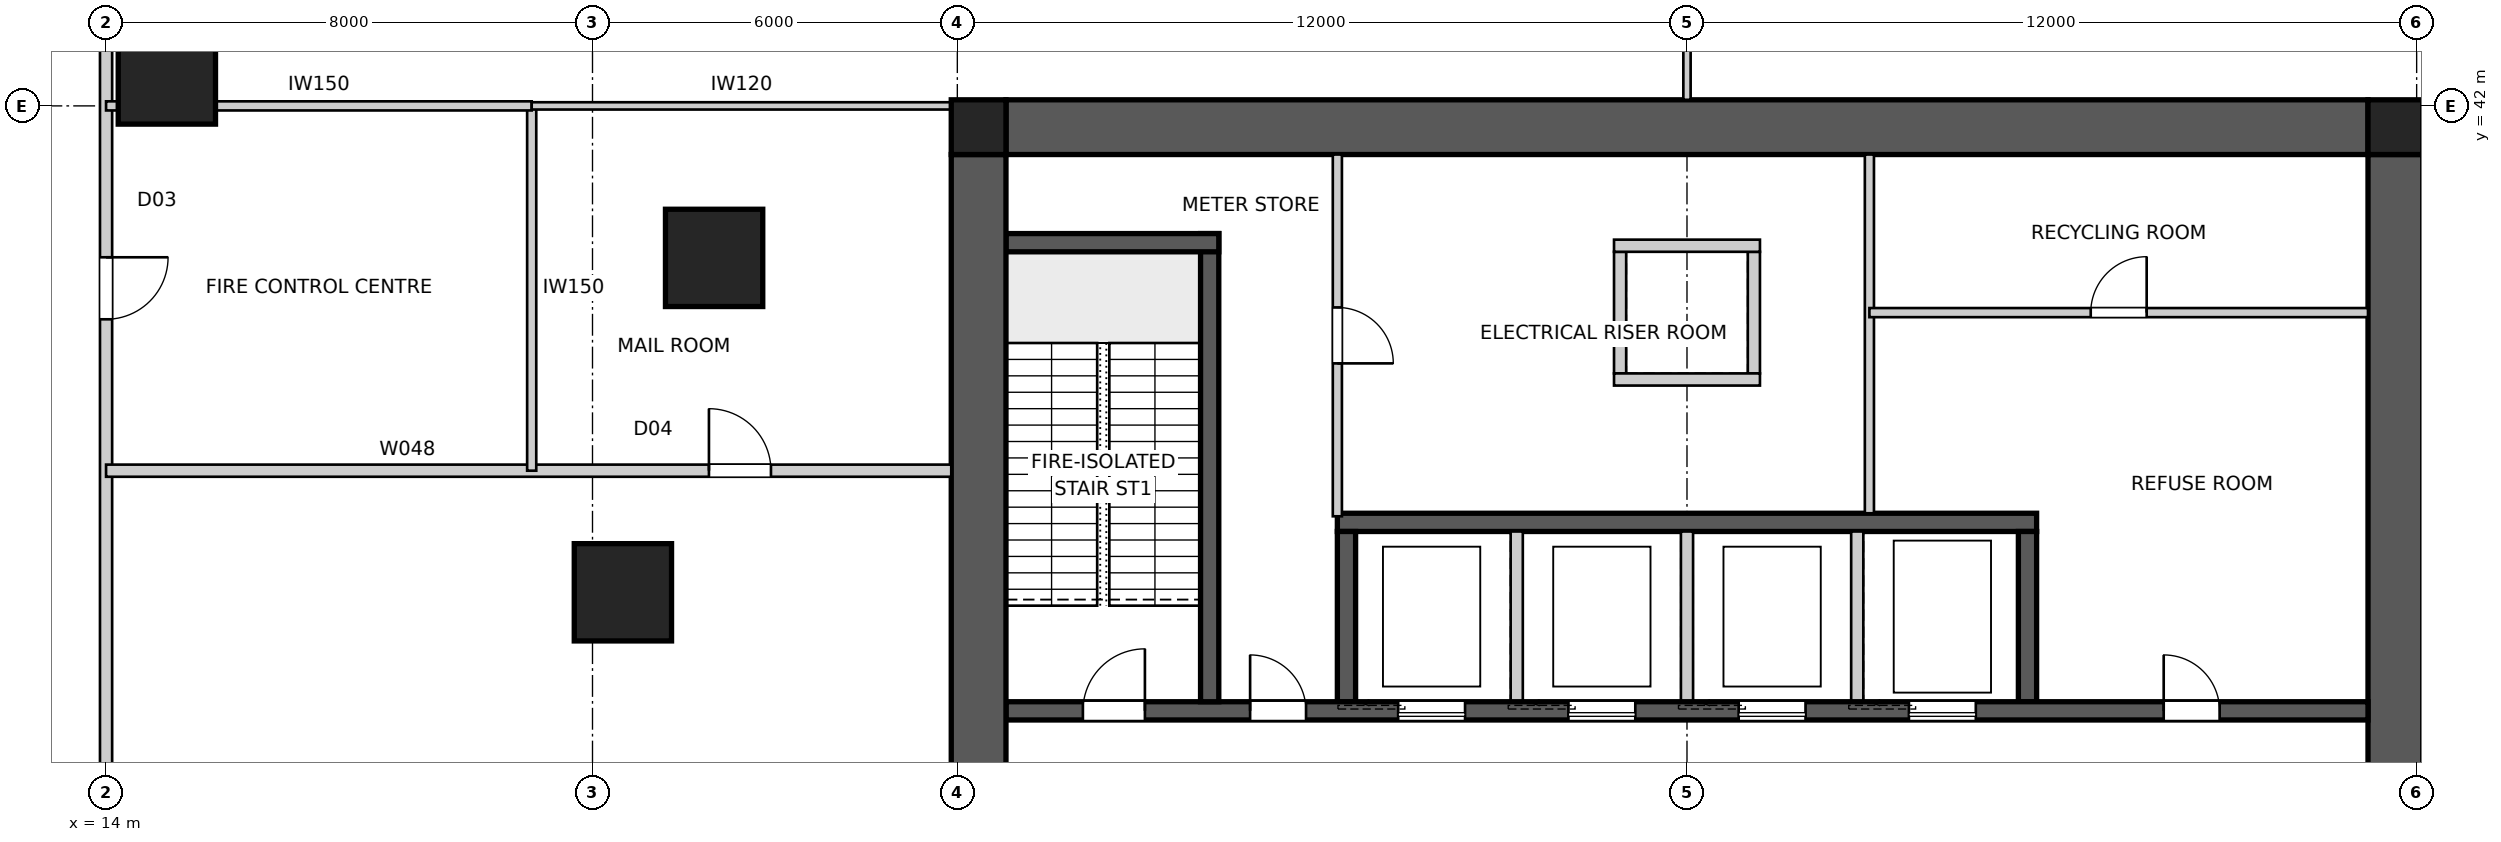
"""IFC4 building model, lengths in metres.
Left out: names, types, materials, properties, quantities, classifications, styles, units other than length and angle.
Written with IfcOpenShell. Run it as: python <this file> out.ifc"""

import sys

from ifc_helpers import new_model, si_unit, direction, frame, frame_2d, origin, origin_2d, place, context, subcontext, project, spatial, polyline, rectangle, outline, extrude, element, fill, save


model = new_model("IFC4")
c1 = context("Model", 3, precision=1e-05, world=origin(), true_north=direction((0.0, 1.0)))
c2 = subcontext(c1, "Body", "Model", "MODEL_VIEW")
j1 = project(units=[si_unit("LENGTHUNIT", "METRE"), si_unit("PLANEANGLEUNIT", "RADIAN")], contexts=[c1])
p1 = place(None, origin())
s1 = spatial("IfcSite", under=j1, at=p1, CompositionType="ELEMENT")
p2 = place(p1, origin())
s2 = spatial("IfcBuilding", under=s1, at=p2, CompositionType="ELEMENT")
p3 = place(p2, origin())
s3 = spatial("IfcBuildingStorey", under=s2, at=p3, CompositionType="ELEMENT", Elevation=0.0)
p4 = place(p3, frame((28.8, 41.65, 0.0), z_axis=(0.0, 0.0, 1.0), x_axis=(1.0, 0.0, 0.0)))
e1 = element("IfcWall", 1, at=p4, inside=s3, PredefinedType="SHEAR", context=c2, shape_type="SweptSolid", body=[
    extrude(outline(polyline([(0.0, -0.45), (22.4, -0.45), (22.4, -0.025), (22.85, -0.025), (22.85, 0.025), (22.4, 0.025), (22.4, 0.45), (0.0, 0.45), (0.0, 0.025), (-0.45, 0.025), (-0.45, -0.025), (0.0, -0.025), (0.0, -0.45)])), origin(), (0.0, 0.0, 1.0), 6.0),
])
p5 = place(p3, frame((51.65, 18.8, 0.0), z_axis=(0.0, 0.0, 1.0), x_axis=(0.0, 1.0, 0.0)))
e2 = element("IfcWall", 2, at=p5, inside=s3, PredefinedType="SHEAR", context=c2, shape_type="SweptSolid", body=[
    extrude(outline(polyline([(0.0, -0.45), (22.4, -0.45), (22.4, -0.025), (22.85, -0.025), (22.85, 0.025), (22.4, 0.025), (22.4, 0.45), (0.0, 0.45), (0.0, 0.025), (-0.45, 0.025), (-0.45, -0.025), (0.0, -0.025), (0.0, -0.45)])), origin(), (0.0, 0.0, 1.0), 6.0),
])
p6 = place(p5, frame((11.14, 0.0, 0.0)))
e3 = element("IfcOpeningElement", 3, at=p6, cuts=e2, PredefinedType="OPENING", context=c2, shape_type="SweptSolid", body=[
    extrude(rectangle(XDim=1.02, YDim=2.4, at=frame_2d((0.51, 1.2))), frame((0.0, 0.46, 0.0), z_axis=(0.0, -1.0, 0.0), x_axis=(1.0, 0.0, 0.0)), (0.0, 0.0, 1.0), 0.92),
])
p7 = place(p3, frame((28.35, 41.2, 0.0), z_axis=(0.0, 0.0, 1.0), x_axis=(0.0, -1.0, 0.0)))
e4 = element("IfcWall", 4, at=p7, inside=s3, PredefinedType="SHEAR", context=c2, shape_type="SweptSolid", body=[
    extrude(outline(polyline([(0.0, -0.45), (22.4, -0.45), (22.4, -0.025), (22.85, -0.025), (22.85, 0.025), (22.4, 0.025), (22.4, 0.45), (0.0, 0.45), (0.0, 0.025), (-0.45, 0.025), (-0.45, -0.025), (0.0, -0.025), (0.0, -0.45)])), origin(), (0.0, 0.0, 1.0), 6.0),
])
p8 = place(p7, frame((11.14, 0.0, 0.0)))
e5 = element("IfcOpeningElement", 5, at=p8, cuts=e4, PredefinedType="OPENING", context=c2, shape_type="SweptSolid", body=[
    extrude(rectangle(XDim=1.02, YDim=2.4, at=frame_2d((0.51, 1.2))), frame((0.0, 0.46, 0.0), z_axis=(0.0, -1.0, 0.0), x_axis=(1.0, 0.0, 0.0)), (0.0, 0.0, 1.0), 0.92),
])
p9 = place(p3, frame((28.8, 32.05, 0.0), z_axis=(0.0, 0.0, 1.0), x_axis=(1.0, 0.0, 0.0)))
e6 = element("IfcWall", 6, at=p9, inside=s3, PredefinedType="SHEAR", context=c2, shape_type="SweptSolid", body=[
    extrude(rectangle(XDim=22.4, YDim=0.3, at=frame_2d((11.2, 0.0))), origin(), (0.0, 0.0, 1.0), 6.0),
])
p10 = place(p9, frame((19.04, 0.0, 0.0)))
e7 = element("IfcOpeningElement", 7, at=p10, cuts=e6, PredefinedType="OPENING", context=c2, shape_type="SweptSolid", body=[
    extrude(rectangle(XDim=0.92, YDim=2.1, at=frame_2d((0.46, 1.05))), frame((0.0, 0.16, 0.0), z_axis=(0.0, -1.0, 0.0), x_axis=(1.0, 0.0, 0.0)), (0.0, 0.0, 1.0), 0.32),
])
p11 = place(p9, frame((1.265, 0.0, 0.0)))
e8 = element("IfcOpeningElement", 8, at=p11, cuts=e6, PredefinedType="OPENING", context=c2, shape_type="SweptSolid", body=[
    extrude(rectangle(XDim=1.02, YDim=2.1, at=frame_2d((0.51, 1.05))), frame((0.0, 0.16, 0.0), z_axis=(0.0, -1.0, 0.0), x_axis=(1.0, 0.0, 0.0)), (0.0, 0.0, 1.0), 0.32),
])
p12 = place(p9, frame((4.015, 0.0, 0.0)))
e9 = element("IfcOpeningElement", 9, at=p12, cuts=e6, PredefinedType="OPENING", context=c2, shape_type="SweptSolid", body=[
    extrude(rectangle(XDim=0.92, YDim=2.1, at=frame_2d((0.46, 1.05))), frame((0.0, 0.16, 0.0), z_axis=(0.0, -1.0, 0.0), x_axis=(1.0, 0.0, 0.0)), (0.0, 0.0, 1.0), 0.32),
])
p13 = place(p9, frame((6.45, 0.0, 0.0)))
e10 = element("IfcOpeningElement", 10, at=p13, cuts=e6, PredefinedType="OPENING", context=c2, shape_type="SweptSolid", body=[
    extrude(rectangle(XDim=1.1, YDim=2.1, at=frame_2d((0.55, 1.05))), frame((0.0, 0.16, 0.0), z_axis=(0.0, -1.0, 0.0), x_axis=(1.0, 0.0, 0.0)), (0.0, 0.0, 1.0), 0.32),
])
p14 = place(p9, frame((9.25, 0.0, 0.0)))
e11 = element("IfcOpeningElement", 11, at=p14, cuts=e6, PredefinedType="OPENING", context=c2, shape_type="SweptSolid", body=[
    extrude(rectangle(XDim=1.1, YDim=2.1, at=frame_2d((0.55, 1.05))), frame((0.0, 0.16, 0.0), z_axis=(0.0, -1.0, 0.0), x_axis=(1.0, 0.0, 0.0)), (0.0, 0.0, 1.0), 0.32),
])
p15 = place(p9, frame((12.05, 0.0, 0.0)))
e12 = element("IfcOpeningElement", 12, at=p15, cuts=e6, PredefinedType="OPENING", context=c2, shape_type="SweptSolid", body=[
    extrude(rectangle(XDim=1.1, YDim=2.1, at=frame_2d((0.55, 1.05))), frame((0.0, 0.16, 0.0), z_axis=(0.0, -1.0, 0.0), x_axis=(1.0, 0.0, 0.0)), (0.0, 0.0, 1.0), 0.32),
])
p16 = place(p9, frame((14.85, 0.0, 0.0)))
e13 = element("IfcOpeningElement", 13, at=p16, cuts=e6, PredefinedType="OPENING", context=c2, shape_type="SweptSolid", body=[
    extrude(rectangle(XDim=1.1, YDim=2.1, at=frame_2d((0.55, 1.05))), frame((0.0, 0.16, 0.0), z_axis=(0.0, -1.0, 0.0), x_axis=(1.0, 0.0, 0.0)), (0.0, 0.0, 1.0), 0.32),
])
p17 = place(p3, frame((34.25, 35.15, 0.0), z_axis=(0.0, 0.0, 1.0), x_axis=(1.0, 0.0, 0.0)))
e14 = element("IfcWall", 14, at=p17, inside=s3, PredefinedType="SHEAR", context=c2, shape_type="SweptSolid", body=[
    extrude(rectangle(XDim=11.5, YDim=0.3, at=frame_2d((5.75, 0.0))), origin(), (0.0, 0.0, 1.0), 6.0),
])
p18 = place(p3, frame((34.4, 32.2, 0.0), z_axis=(0.0, 0.0, 1.0), x_axis=(0.0, 1.0, 0.0)))
e15 = element("IfcWall", 15, at=p18, inside=s3, PredefinedType="SHEAR", context=c2, shape_type="SweptSolid", body=[
    extrude(rectangle(XDim=2.8, YDim=0.3, at=frame_2d((1.4, 0.0))), origin(), (0.0, 0.0, 1.0), 6.0),
])
for number, where, z_axis, x_axis in (
    (16, (37.2, 32.2, 0.0), (0.0, 0.0, 1.0), (0.0, 1.0, 0.0)),
    (17, (40.0, 32.2, 0.0), (0.0, 0.0, 1.0), (0.0, 1.0, 0.0)),
    (18, (42.8, 32.2, 0.0), (0.0, 0.0, 1.0), (0.0, 1.0, 0.0)),
):
    element("IfcWall", number, at=place(p3, frame(where, z_axis=z_axis, x_axis=x_axis)), inside=s3, PredefinedType="SOLIDWALL", context=c2, shape_type="SweptSolid", body=[
        extrude(rectangle(XDim=2.8, YDim=0.2, at=frame_2d((1.4, 0.0))), origin(), (0.0, 0.0, 1.0), 6.0),
    ])
p19 = place(p3, frame((45.6, 32.2, 0.0), z_axis=(0.0, 0.0, 1.0), x_axis=(0.0, 1.0, 0.0)))
e19 = element("IfcWall", 19, at=p19, inside=s3, PredefinedType="SHEAR", context=c2, shape_type="SweptSolid", body=[
    extrude(rectangle(XDim=2.8, YDim=0.3, at=frame_2d((1.4, 0.0))), origin(), (0.0, 0.0, 1.0), 6.0),
])
p20 = place(p3, frame((32.15, 32.2, 0.0), z_axis=(0.0, 0.0, 1.0), x_axis=(0.0, 1.0, 0.0)))
e20 = element("IfcWall", 20, at=p20, inside=s3, PredefinedType="SHEAR", context=c2, shape_type="SweptSolid", body=[
    extrude(rectangle(XDim=7.7, YDim=0.3, at=frame_2d((3.85, 0.0))), origin(), (0.0, 0.0, 1.0), 6.0),
])
p21 = place(p3, frame((28.8, 39.75, 0.0), z_axis=(0.0, 0.0, 1.0), x_axis=(1.0, 0.0, 0.0)))
e21 = element("IfcWall", 21, at=p21, inside=s3, PredefinedType="SHEAR", context=c2, shape_type="SweptSolid", body=[
    extrude(rectangle(XDim=3.5, YDim=0.3, at=frame_2d((1.75, 0.0))), origin(), (0.0, 0.0, 1.0), 6.0),
])
for number, where, z_axis, x_axis in (
    (22, (38.9, 37.6, 0.0), (0.0, 0.0, 1.0), (0.0, 1.0, 0.0)),
    (23, (41.1, 37.6, 0.0), (0.0, 0.0, 1.0), (0.0, 1.0, 0.0)),
):
    element("IfcWall", number, at=place(p3, frame(where, z_axis=z_axis, x_axis=x_axis)), inside=s3, PredefinedType="SOLIDWALL", context=c2, shape_type="SweptSolid", body=[
        extrude(rectangle(XDim=2.0, YDim=0.2, at=frame_2d((1.0, 0.0))), origin(), (0.0, 0.0, 1.0), 6.0),
    ])
for number, where, z_axis, x_axis in (
    (24, (38.8, 37.5, 0.0), (0.0, 0.0, 1.0), (1.0, 0.0, 0.0)),
    (25, (38.8, 39.7, 0.0), (0.0, 0.0, 1.0), (1.0, 0.0, 0.0)),
):
    element("IfcWall", number, at=place(p3, frame(where, z_axis=z_axis, x_axis=x_axis)), inside=s3, PredefinedType="SOLIDWALL", context=c2, shape_type="SweptSolid", body=[
        extrude(rectangle(XDim=2.4, YDim=0.2, at=frame_2d((1.2, 0.0))), origin(), (0.0, 0.0, 1.0), 6.0),
    ])
for number, where, z_axis, x_axis in (
    (26, (51.65, 41.65, 0.0), (0.0, 0.0, 1.0), (1.0, 0.0, 0.0)),
    (27, (28.35, 41.65, 0.0), (0.0, 0.0, 1.0), (1.0, 0.0, 0.0)),
):
    element("IfcColumn", number, at=place(p3, frame(where, z_axis=z_axis, x_axis=x_axis)), inside=s3, PredefinedType="COLUMN", context=c2, shape_type="SweptSolid", body=[
        extrude(rectangle(XDim=0.9, YDim=0.9, at=origin_2d()), origin(), (0.0, 0.0, 1.0), 6.0),
    ])
for number, where, z_axis, x_axis in (
    (28, (15.0, 42.5, 0.0), (0.0, 0.0, 1.0), (1.0, 0.0, 0.0)),
    (29, (24.0, 39.5, 0.0), (0.0, 0.0, 1.0), (1.0, 0.0, 0.0)),
    (30, (22.5, 34.0, 0.0), (0.0, 0.0, 1.0), (1.0, 0.0, 0.0)),
):
    element("IfcColumn", number, at=place(p3, frame(where, z_axis=z_axis, x_axis=x_axis)), inside=s3, PredefinedType="COLUMN", context=c2, shape_type="SweptSolid", body=[
        extrude(rectangle(XDim=1.6, YDim=1.6, at=origin_2d()), origin(), (0.0, 0.0, 1.0), 6.0),
    ])
p22 = place(p3, frame((34.25, 41.2, 0.0), z_axis=(0.0, 0.0, 1.0), x_axis=(0.0, -1.0, 0.0)))
e31 = element("IfcWall", 31, at=p22, inside=s3, PredefinedType="SOLIDWALL", context=c2, shape_type="SweptSolid", body=[
    extrude(rectangle(XDim=5.95, YDim=0.15, at=frame_2d((2.975, 0.0))), origin(), (0.0, 0.0, 1.0), 5.65),
])
p23 = place(p22, frame((2.515, 0.0, 0.0)))
e32 = element("IfcOpeningElement", 32, at=p23, cuts=e31, PredefinedType="OPENING", context=c2, shape_type="SweptSolid", body=[
    extrude(rectangle(XDim=0.92, YDim=2.1, at=frame_2d((0.46, 1.05))), frame((0.0, 0.085, 0.0), z_axis=(0.0, -1.0, 0.0), x_axis=(1.0, 0.0, 0.0)), (0.0, 0.0, 1.0), 0.17),
])
p24 = place(p3, frame((43.0, 41.2, 0.0), z_axis=(0.0, 0.0, 1.0), x_axis=(0.0, -1.0, 0.0)))
e33 = element("IfcWall", 33, at=p24, inside=s3, PredefinedType="SOLIDWALL", context=c2, shape_type="SweptSolid", body=[
    extrude(rectangle(XDim=5.9, YDim=0.15, at=frame_2d((2.95, 0.0))), origin(), (0.0, 0.0, 1.0), 5.65),
])
p25 = place(p3, frame((43.0, 38.6, 0.0), z_axis=(0.0, 0.0, 1.0), x_axis=(1.0, 0.0, 0.0)))
e34 = element("IfcWall", 34, at=p25, inside=s3, PredefinedType="SOLIDWALL", context=c2, shape_type="SweptSolid", body=[
    extrude(rectangle(XDim=8.2, YDim=0.15, at=frame_2d((4.1, 0.0))), origin(), (0.0, 0.0, 1.0), 5.65),
])
p26 = place(p25, frame((3.64, 0.0, 0.0)))
e35 = element("IfcOpeningElement", 35, at=p26, cuts=e34, PredefinedType="OPENING", context=c2, shape_type="SweptSolid", body=[
    extrude(rectangle(XDim=0.92, YDim=2.1, at=frame_2d((0.46, 1.05))), frame((0.0, 0.085, 0.0), z_axis=(0.0, -1.0, 0.0), x_axis=(1.0, 0.0, 0.0)), (0.0, 0.0, 1.0), 0.17),
])
p27 = place(p3, frame((14.0, 57.0, 0.0), z_axis=(0.0, 0.0, 1.0), x_axis=(0.0, -1.0, 0.0)))
e36 = element("IfcWall", 36, at=p27, inside=s3, PredefinedType="PARTITIONING", context=c2, shape_type="SweptSolid", body=[
    extrude(rectangle(XDim=54.0, YDim=0.2, at=frame_2d((27.0, 0.0))), origin(), (0.0, 0.0, 1.0), 5.65),
])
p28 = place(p27, frame((29.49, 0.0, 0.0)))
e37 = element("IfcOpeningElement", 37, at=p28, cuts=e36, PredefinedType="OPENING", context=c2, shape_type="SweptSolid", body=[
    extrude(rectangle(XDim=1.02, YDim=2.4, at=frame_2d((0.51, 1.2))), frame((0.0, 0.11, 0.0), z_axis=(0.0, -1.0, 0.0), x_axis=(1.0, 0.0, 0.0)), (0.0, 0.0, 1.0), 0.22),
])
p29 = place(p27, frame((46.615, 0.0, 0.0)))
e38 = element("IfcOpeningElement", 38, at=p29, cuts=e36, PredefinedType="OPENING", context=c2, shape_type="SweptSolid", body=[
    extrude(rectangle(XDim=0.92, YDim=2.34, at=frame_2d((0.46, 1.17))), frame((0.0, 0.11, 0.0), z_axis=(0.0, -1.0, 0.0), x_axis=(1.0, 0.0, 0.0)), (0.0, 0.0, 1.0), 0.22),
])
p30 = place(p27, frame((6.465, 0.0, 0.0)))
e39 = element("IfcOpeningElement", 39, at=p30, cuts=e36, PredefinedType="OPENING", context=c2, shape_type="SweptSolid", body=[
    extrude(rectangle(XDim=0.92, YDim=2.34, at=frame_2d((0.46, 1.17))), frame((0.0, 0.11, 0.0), z_axis=(0.0, -1.0, 0.0), x_axis=(1.0, 0.0, 0.0)), (0.0, 0.0, 1.0), 0.22),
])
p31 = place(p27, frame((17.49, 0.0, 0.0)))
e40 = element("IfcOpeningElement", 40, at=p31, cuts=e36, PredefinedType="OPENING", context=c2, shape_type="SweptSolid", body=[
    extrude(rectangle(XDim=1.02, YDim=2.1, at=frame_2d((0.51, 1.05))), frame((0.0, 0.11, 0.0), z_axis=(0.0, -1.0, 0.0), x_axis=(1.0, 0.0, 0.0)), (0.0, 0.0, 1.0), 0.22),
])
p32 = place(p3, frame((14.0, 36.0, 0.0), z_axis=(0.0, 0.0, 1.0), x_axis=(1.0, 0.0, 0.0)))
e41 = element("IfcWall", 41, at=p32, inside=s3, PredefinedType="PARTITIONING", context=c2, shape_type="SweptSolid", body=[
    extrude(rectangle(XDim=13.9, YDim=0.2, at=frame_2d((6.95, 0.0))), origin(), (0.0, 0.0, 1.0), 5.65),
])
p33 = place(p32, frame((9.915, 0.0, 0.0)))
e42 = element("IfcOpeningElement", 42, at=p33, cuts=e41, PredefinedType="OPENING", context=c2, shape_type="SweptSolid", body=[
    extrude(rectangle(XDim=1.02, YDim=2.4, at=frame_2d((0.51, 1.2))), frame((0.0, 0.11, 0.0), z_axis=(0.0, -1.0, 0.0), x_axis=(1.0, 0.0, 0.0)), (0.0, 0.0, 1.0), 0.22),
])
p34 = place(p3, frame((21.0, 42.0, 0.0), z_axis=(0.0, 0.0, 1.0), x_axis=(0.0, -1.0, 0.0)))
e43 = element("IfcWall", 43, at=p34, inside=s3, PredefinedType="SOLIDWALL", context=c2, shape_type="SweptSolid", body=[
    extrude(rectangle(XDim=6.0, YDim=0.15, at=frame_2d((3.0, 0.0))), origin(), (0.0, 0.0, 1.0), 5.65),
])
p35 = place(p3, frame((14.0, 42.0, 0.0), z_axis=(0.0, 0.0, 1.0), x_axis=(1.0, 0.0, 0.0)))
e44 = element("IfcWall", 44, at=p35, inside=s3, PredefinedType="SOLIDWALL", context=c2, shape_type="SweptSolid", body=[
    extrude(rectangle(XDim=7.0, YDim=0.15, at=frame_2d((3.5, 0.0))), origin(), (0.0, 0.0, 1.0), 5.65),
])
p36 = place(p3, frame((21.0, 42.0, 0.0), z_axis=(0.0, 0.0, 1.0), x_axis=(1.0, 0.0, 0.0)))
e45 = element("IfcWall", 45, at=p36, inside=s3, PredefinedType="PARTITIONING", context=c2, shape_type="SweptSolid", body=[
    extrude(rectangle(XDim=6.9, YDim=0.12, at=frame_2d((3.45, 0.0))), origin(), (0.0, 0.0, 1.0), 5.65),
])
p37 = place(p3, frame((40.0, 57.0, 0.0), z_axis=(0.0, 0.0, 1.0), x_axis=(0.0, -1.0, 0.0)))
e46 = element("IfcWall", 46, at=p37, inside=s3, PredefinedType="PARTITIONING", context=c2, shape_type="SweptSolid", body=[
    extrude(rectangle(XDim=14.9, YDim=0.12, at=frame_2d((7.45, 0.0))), origin(), (0.0, 0.0, 1.0), 5.65),
])
p38 = place(p10, origin())
e47 = element("IfcDoor", 47, at=p38, inside=s3, OperationType="SINGLE_SWING_LEFT", PredefinedType="DOOR", context=c2, shape_type="SweptSolid", body=[
    extrude(rectangle(XDim=0.92, YDim=2.1, at=frame_2d((0.46, 1.05))), frame((0.0, 0.025, 0.0), z_axis=(0.0, -1.0, 0.0), x_axis=(1.0, 0.0, 0.0)), (0.0, 0.0, 1.0), 0.05),
])
fill(e7, e47)
p39 = place(p11, origin())
e48 = element("IfcDoor", 48, at=p39, inside=s3, OperationType="SINGLE_SWING_RIGHT", PredefinedType="DOOR", context=c2, shape_type="SweptSolid", body=[
    extrude(rectangle(XDim=1.02, YDim=2.1, at=frame_2d((0.51, 1.05))), frame((0.0, 0.025, 0.0), z_axis=(0.0, -1.0, 0.0), x_axis=(1.0, 0.0, 0.0)), (0.0, 0.0, 1.0), 0.05),
])
fill(e8, e48)
p40 = place(p12, origin())
e49 = element("IfcDoor", 49, at=p40, inside=s3, OperationType="SINGLE_SWING_LEFT", PredefinedType="DOOR", context=c2, shape_type="SweptSolid", body=[
    extrude(rectangle(XDim=0.92, YDim=2.1, at=frame_2d((0.46, 1.05))), frame((0.0, 0.025, 0.0), z_axis=(0.0, -1.0, 0.0), x_axis=(1.0, 0.0, 0.0)), (0.0, 0.0, 1.0), 0.05),
])
fill(e9, e49)
p41 = place(p31, origin())
e50 = element("IfcDoor", 50, at=p41, inside=s3, OperationType="SINGLE_SWING_LEFT", PredefinedType="DOOR", context=c2, shape_type="SweptSolid", body=[
    extrude(rectangle(XDim=1.02, YDim=2.1, at=frame_2d((0.51, 1.05))), frame((0.0, 0.025, 0.0), z_axis=(0.0, -1.0, 0.0), x_axis=(1.0, 0.0, 0.0)), (0.0, 0.0, 1.0), 0.05),
])
fill(e40, e50)
p42 = place(p26, origin())
e51 = element("IfcDoor", 51, at=p42, inside=s3, OperationType="SINGLE_SWING_RIGHT", PredefinedType="DOOR", context=c2, shape_type="SweptSolid", body=[
    extrude(rectangle(XDim=0.92, YDim=2.1, at=frame_2d((0.46, 1.05))), frame((0.0, 0.025, 0.0), z_axis=(0.0, -1.0, 0.0), x_axis=(1.0, 0.0, 0.0)), (0.0, 0.0, 1.0), 0.05),
])
fill(e35, e51)
p43 = place(p23, origin())
e52 = element("IfcDoor", 52, at=p43, inside=s3, OperationType="SINGLE_SWING_RIGHT", PredefinedType="DOOR", context=c2, shape_type="SweptSolid", body=[
    extrude(rectangle(XDim=0.92, YDim=2.1, at=frame_2d((0.46, 1.05))), frame((0.0, 0.025, 0.0), z_axis=(0.0, -1.0, 0.0), x_axis=(1.0, 0.0, 0.0)), (0.0, 0.0, 1.0), 0.05),
])
fill(e32, e52)
p44 = place(p33, origin())
e53 = element("IfcDoor", 53, at=p44, inside=s3, OperationType="SINGLE_SWING_LEFT", PredefinedType="DOOR", context=c2, shape_type="SweptSolid", body=[
    extrude(rectangle(XDim=1.02, YDim=2.4, at=frame_2d((0.51, 1.2))), frame((0.0, 0.025, 0.0), z_axis=(0.0, -1.0, 0.0), x_axis=(1.0, 0.0, 0.0)), (0.0, 0.0, 1.0), 0.05),
])
fill(e42, e53)
p45 = place(p13, origin())
e54 = element("IfcDoor", 54, at=p45, inside=s3, OperationType="SLIDING_TO_LEFT", PredefinedType="DOOR", context=c2, shape_type="SweptSolid", body=[
    extrude(rectangle(XDim=1.1, YDim=2.1, at=frame_2d((0.55, 1.05))), frame((0.0, 0.025, 0.0), z_axis=(0.0, -1.0, 0.0), x_axis=(1.0, 0.0, 0.0)), (0.0, 0.0, 1.0), 0.05),
])
fill(e10, e54)
p46 = place(p14, origin())
e55 = element("IfcDoor", 55, at=p46, inside=s3, OperationType="SLIDING_TO_LEFT", PredefinedType="DOOR", context=c2, shape_type="SweptSolid", body=[
    extrude(rectangle(XDim=1.1, YDim=2.1, at=frame_2d((0.55, 1.05))), frame((0.0, 0.025, 0.0), z_axis=(0.0, -1.0, 0.0), x_axis=(1.0, 0.0, 0.0)), (0.0, 0.0, 1.0), 0.05),
])
fill(e11, e55)
p47 = place(p15, origin())
e56 = element("IfcDoor", 56, at=p47, inside=s3, OperationType="SLIDING_TO_LEFT", PredefinedType="DOOR", context=c2, shape_type="SweptSolid", body=[
    extrude(rectangle(XDim=1.1, YDim=2.1, at=frame_2d((0.55, 1.05))), frame((0.0, 0.025, 0.0), z_axis=(0.0, -1.0, 0.0), x_axis=(1.0, 0.0, 0.0)), (0.0, 0.0, 1.0), 0.05),
])
fill(e12, e56)
p48 = place(p16, origin())
e57 = element("IfcDoor", 57, at=p48, inside=s3, OperationType="SLIDING_TO_LEFT", PredefinedType="DOOR", context=c2, shape_type="SweptSolid", body=[
    extrude(rectangle(XDim=1.1, YDim=2.1, at=frame_2d((0.55, 1.05))), frame((0.0, 0.025, 0.0), z_axis=(0.0, -1.0, 0.0), x_axis=(1.0, 0.0, 0.0)), (0.0, 0.0, 1.0), 0.05),
])
fill(e13, e57)
save(model, sys.argv[1])
